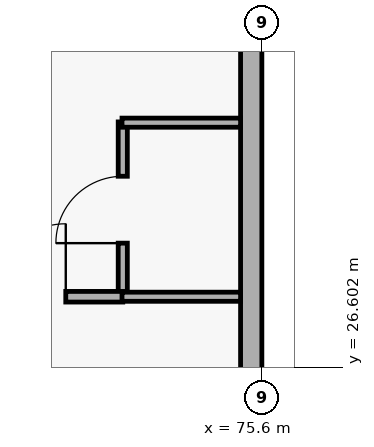
"""IFC4 building model, lengths in metres.
Left out: names, types, materials, properties, quantities, classifications, styles, units other than length and angle.
Written with IfcOpenShell. Run it as: python <this file> out.ifc"""

import sys

from ifc_helpers import new_model, si_unit, direction, frame, frame_2d, origin, place, context, subcontext, project, spatial, rectangle, extrude, element, fill, save


model = new_model("IFC4")
c1 = context("Model", 3, precision=1e-05, world=origin(), true_north=direction((0.0, 1.0)))
c2 = subcontext(c1, "Body", "Model", "MODEL_VIEW")
j1 = project(units=[si_unit("LENGTHUNIT", "METRE"), si_unit("PLANEANGLEUNIT", "RADIAN")], contexts=[c1])
p1 = place(None, origin())
s1 = spatial("IfcSite", under=j1, at=p1, CompositionType="ELEMENT")
p2 = place(p1, origin())
s2 = spatial("IfcBuilding", under=s1, at=p2, CompositionType="ELEMENT")
p3 = place(p2, frame((0.0, 0.0, 33.6)))
s3 = spatial("IfcBuildingStorey", under=s2, at=p3, CompositionType="ELEMENT", Elevation=33.6)
p4 = place(p3, frame((75.46, 34.0, 0.0), z_axis=(0.0, 0.0, 1.0), x_axis=(0.0, -1.0, 0.0)))
e1 = element("IfcWall", 1, at=p4, inside=s3, PredefinedType="SOLIDWALL", context=c2, shape_type="SweptSolid", body=[
    extrude(rectangle(XDim=25.2, YDim=0.28, at=frame_2d((12.6, 0.0))), origin(), (0.0, 0.0, 1.0), 3.34),
])
p5 = place(p4, frame((21.9, 0.0, 0.95)))
e2 = element("IfcOpeningElement", 2, at=p5, cuts=e1, PredefinedType="OPENING", context=c2, shape_type="SweptSolid", body=[
    extrude(rectangle(XDim=1.6, YDim=1.6, at=frame_2d((0.8, 0.8))), frame((0.0, 0.15, 0.0), z_axis=(0.0, -1.0, 0.0), x_axis=(1.0, 0.0, 0.0)), (0.0, 0.0, 1.0), 0.3),
])
p6 = place(p3, frame((73.77, 27.52, 0.0), z_axis=(0.0, 0.0, 1.0), x_axis=(0.0, 1.0, 0.0)))
e3 = element("IfcWall", 3, at=p6, inside=s3, PredefinedType="PARTITIONING", context=c2, shape_type="SweptSolid", body=[
    extrude(rectangle(XDim=2.31, YDim=0.12, at=frame_2d((1.155, 0.0))), origin(), (0.0, 0.0, 1.0), 2.48),
])
p7 = place(p6, frame((0.715, 0.0, 0.0)))
e4 = element("IfcOpeningElement", 4, at=p7, cuts=e3, PredefinedType="OPENING", context=c2, shape_type="SweptSolid", body=[
    extrude(rectangle(XDim=0.88, YDim=2.15, at=frame_2d((0.44, 1.075))), frame((0.0, 0.07, 0.0), z_axis=(0.0, -1.0, 0.0), x_axis=(1.0, 0.0, 0.0)), (0.0, 0.0, 1.0), 0.14),
])
p8 = place(p3, frame((71.462, 27.53, 0.0), z_axis=(0.0, 0.0, 1.0), x_axis=(1.0, 0.0, 0.0)))
e5 = element("IfcWall", 5, at=p8, inside=s3, PredefinedType="PARTITIONING", context=c2, shape_type="SweptSolid", body=[
    extrude(rectangle(XDim=2.308, YDim=0.14, at=frame_2d((1.154, 0.0))), origin(), (0.0, 0.0, 1.0), 2.48),
])
p9 = place(p8, frame((0.598, 0.0, 0.0)))
e6 = element("IfcOpeningElement", 6, at=p9, cuts=e5, PredefinedType="OPENING", context=c2, shape_type="SweptSolid", body=[
    extrude(rectangle(XDim=0.96, YDim=2.25, at=frame_2d((0.48, 1.125))), frame((0.0, 0.08, 0.0), z_axis=(0.0, -1.0, 0.0), x_axis=(1.0, 0.0, 0.0)), (0.0, 0.0, 1.0), 0.16),
])
for number, where, z_axis, x_axis in (
    (7, (73.76, 27.53, 0.0), (0.0, 0.0, 1.0), (1.0, 0.0, 0.0)),
    (8, (73.76, 29.82, 0.0), (0.0, 0.0, 1.0), (1.0, 0.0, 0.0)),
):
    element("IfcWall", number, at=place(p3, frame(where, z_axis=z_axis, x_axis=x_axis)), inside=s3, PredefinedType="PARTITIONING", context=c2, shape_type="SweptSolid", body=[
        extrude(rectangle(XDim=1.56, YDim=0.12, at=frame_2d((0.78, 0.0))), origin(), (0.0, 0.0, 1.0), 2.48),
    ])
p10 = place(p7, origin())
e9 = element("IfcDoor", 9, at=p10, inside=s3, OperationType="SINGLE_SWING_LEFT", PredefinedType="DOOR", context=c2, shape_type="SweptSolid", body=[
    extrude(rectangle(XDim=0.88, YDim=2.15, at=frame_2d((0.44, 1.075))), frame((0.0, 0.025, 0.0), z_axis=(0.0, -1.0, 0.0), x_axis=(1.0, 0.0, 0.0)), (0.0, 0.0, 1.0), 0.05),
])
fill(e4, e9)
p11 = place(p9, origin())
e10 = element("IfcDoor", 10, at=p11, inside=s3, OperationType="SINGLE_SWING_RIGHT", PredefinedType="DOOR", context=c2, shape_type="SweptSolid", body=[
    extrude(rectangle(XDim=0.96, YDim=2.25, at=frame_2d((0.48, 1.125))), frame((0.0, 0.025, 0.0), z_axis=(0.0, -1.0, 0.0), x_axis=(1.0, 0.0, 0.0)), (0.0, 0.0, 1.0), 0.05),
])
fill(e6, e10)
save(model, sys.argv[1])
